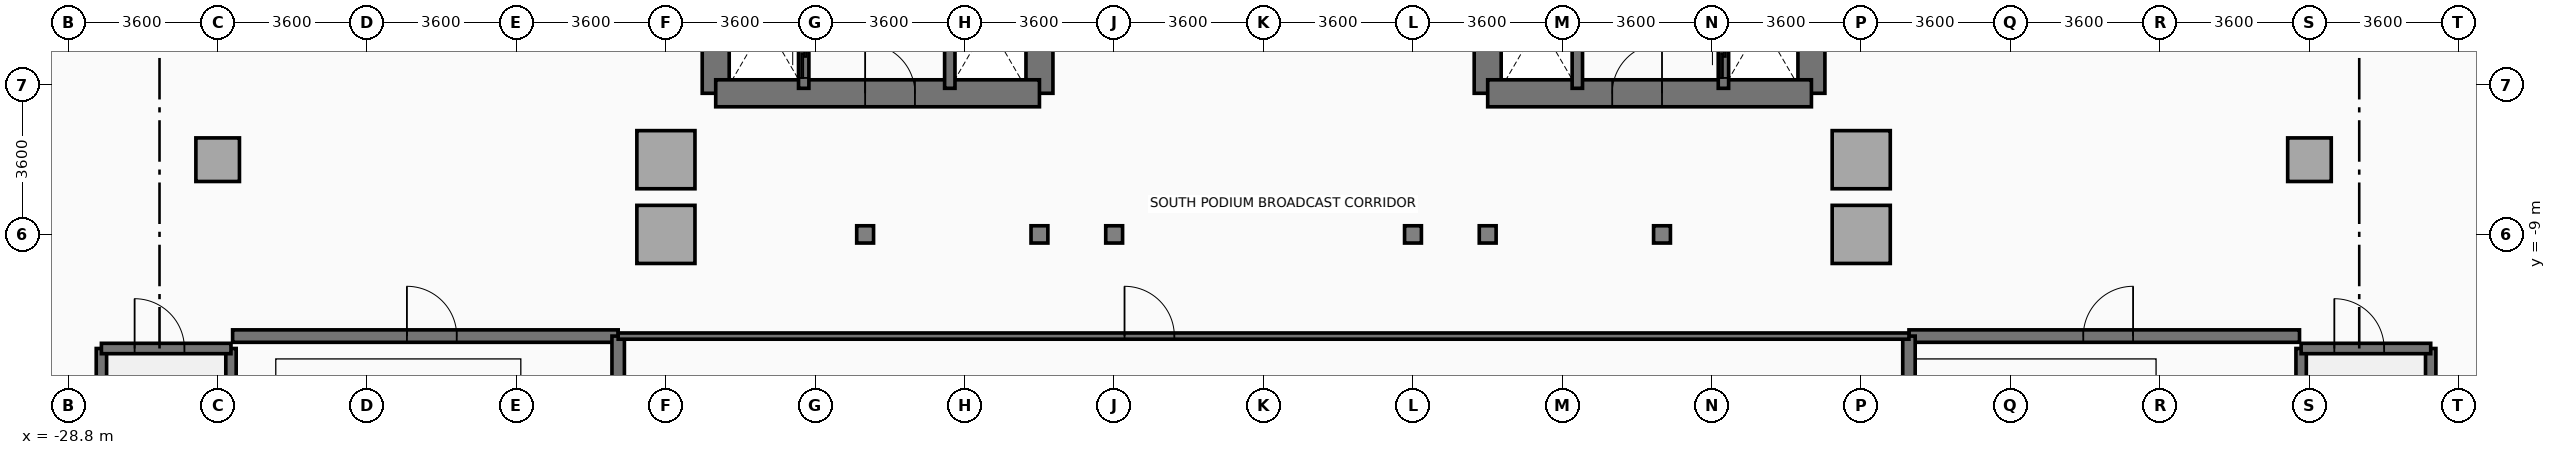
"""IFC4 building model, lengths in metres.
Left out: names, types, materials, properties, quantities, classifications, styles, units other than length and angle.
Written with IfcOpenShell. Run it as: python <this file> out.ifc"""

import sys

from ifc_helpers import new_model, si_unit, direction, frame, frame_2d, origin, origin_2d, place, context, subcontext, project, spatial, rectangle, i_section, extrude, source, transform, mapped, element, fill, save


model = new_model("IFC4")
c1 = context("Model", 3, precision=1e-05, world=origin(), true_north=direction((0.0, 1.0)))
c2 = subcontext(c1, "Body", "Model", "MODEL_VIEW")
j1 = project(units=[si_unit("LENGTHUNIT", "METRE"), si_unit("PLANEANGLEUNIT", "RADIAN")], contexts=[c1])
p1 = place(None, origin())
s1 = spatial("IfcSite", under=j1, at=p1, CompositionType="ELEMENT")
p2 = place(p1, origin())
s2 = spatial("IfcBuilding", under=s1, at=p2, CompositionType="ELEMENT")
p3 = place(p2, frame((0.0, 0.0, 10.2)))
s3 = spatial("IfcBuildingStorey", under=s2, at=p3, CompositionType="ELEMENT", Elevation=10.2)
m1 = source(origin(), c2, "Body", "SweptSolid", [
    extrude(rectangle(XDim=1.05, YDim=1.05, at=origin_2d()), origin(), (0.0, 0.0, 1.0), 5.15),
])
p4 = place(p3, frame((-25.2, -7.2, 0.0), z_axis=(0.0, 0.0, 1.0), x_axis=(1.0, 0.0, 0.0)))
e1 = element("IfcColumn", 1, at=p4, inside=s3, PredefinedType="COLUMN", context=c2, shape_type="MappedRepresentation", body=[
    mapped(m1, transform((0.0, 0.0, 0.0), x_axis=(1.0, 0.0, 0.0), y_axis=(0.0, 1.0, 0.0), z_axis=(0.0, 0.0, 1.0), scale=1.0)),
])
m2 = source(origin(), c2, "Body", "SweptSolid", [
    extrude(rectangle(XDim=1.4, YDim=1.4, at=origin_2d()), origin(), (0.0, 0.0, 1.0), 5.15),
])
for number, where, z_axis, x_axis in (
    (2, (-14.4, -9.0, 0.0), (0.0, 0.0, 1.0), (1.0, 0.0, 0.0)),
    (3, (-14.4, -7.2, 0.0), (0.0, 0.0, 1.0), (1.0, 0.0, 0.0)),
):
    element("IfcColumn", number, at=place(p3, frame(where, z_axis=z_axis, x_axis=x_axis)), inside=s3, PredefinedType="COLUMN", context=c2, shape_type="MappedRepresentation", body=[
        mapped(m2, transform((0.0, 0.0, 0.0), x_axis=(1.0, 0.0, 0.0), y_axis=(0.0, 1.0, 0.0), z_axis=(0.0, 0.0, 1.0), scale=1.0)),
    ])
m3 = source(origin(), c2, "Body", "SweptSolid", [
    extrude(i_section(OverallWidth=0.406, OverallDepth=0.416, WebThickness=0.024, FlangeThickness=0.039, at=origin_2d()), origin(), (0.0, 0.0, 1.0), 5.15),
])
for number, where, z_axis, x_axis in (
    (4, (-9.6, -9.0, 0.0), (0.0, 0.0, 1.0), (1.0, 0.0, 0.0)),
    (5, (-5.4, -9.0, 0.0), (0.0, 0.0, 1.0), (1.0, 0.0, 0.0)),
    (6, (-3.6, -9.0, 0.0), (0.0, 0.0, 1.0), (1.0, 0.0, 0.0)),
    (7, (3.6, -9.0, 0.0), (0.0, 0.0, 1.0), (1.0, 0.0, 0.0)),
    (8, (5.4, -9.0, 0.0), (0.0, 0.0, 1.0), (1.0, 0.0, 0.0)),
    (9, (9.6, -9.0, 0.0), (0.0, 0.0, 1.0), (1.0, 0.0, 0.0)),
):
    element("IfcColumn", number, at=place(p3, frame(where, z_axis=z_axis, x_axis=x_axis)), inside=s3, PredefinedType="COLUMN", context=c2, shape_type="MappedRepresentation", body=[
        mapped(m3, transform((0.0, 0.0, 0.0), x_axis=(1.0, 0.0, 0.0), y_axis=(0.0, 1.0, 0.0), z_axis=(0.0, 0.0, 1.0), scale=1.0)),
    ])
for number, where, z_axis, x_axis in (
    (10, (14.4, -9.0, 0.0), (0.0, 0.0, 1.0), (1.0, 0.0, 0.0)),
    (11, (14.4, -7.2, 0.0), (0.0, 0.0, 1.0), (1.0, 0.0, 0.0)),
):
    element("IfcColumn", number, at=place(p3, frame(where, z_axis=z_axis, x_axis=x_axis)), inside=s3, PredefinedType="COLUMN", context=c2, shape_type="MappedRepresentation", body=[
        mapped(m2, transform((0.0, 0.0, 0.0), x_axis=(1.0, 0.0, 0.0), y_axis=(0.0, 1.0, 0.0), z_axis=(0.0, 0.0, 1.0), scale=1.0)),
    ])
p5 = place(p3, frame((25.2, -7.2, 0.0), z_axis=(0.0, 0.0, 1.0), x_axis=(1.0, 0.0, 0.0)))
e12 = element("IfcColumn", 12, at=p5, inside=s3, PredefinedType="COLUMN", context=c2, shape_type="MappedRepresentation", body=[
    mapped(m1, transform((0.0, 0.0, 0.0), x_axis=(1.0, 0.0, 0.0), y_axis=(0.0, 1.0, 0.0), z_axis=(0.0, 0.0, 1.0), scale=1.0)),
])
p6 = place(p3, frame((-13.2, -5.6, 0.0), z_axis=(0.0, 0.0, 1.0), x_axis=(0.0, 1.0, 0.0)))
e13 = element("IfcWall", 13, at=p6, inside=s3, PredefinedType="SHEAR", context=c2, shape_type="SweptSolid", body=[
    extrude(rectangle(XDim=11.2, YDim=0.65, at=frame_2d((5.6, 0.0))), origin(), (0.0, 0.0, 1.0), 5.15),
])
p7 = place(p3, frame((-5.4, -5.6, 0.0), z_axis=(0.0, 0.0, 1.0), x_axis=(0.0, 1.0, 0.0)))
e14 = element("IfcWall", 14, at=p7, inside=s3, PredefinedType="SHEAR", context=c2, shape_type="SweptSolid", body=[
    extrude(rectangle(XDim=12.5, YDim=0.65, at=frame_2d((6.25, 0.0))), origin(), (0.0, 0.0, 1.0), 5.15),
])
p8 = place(p7, frame((4.55, 0.0, 0.0)))
e15 = element("IfcOpeningElement", 15, at=p8, cuts=e14, PredefinedType="OPENING", context=c2, shape_type="SweptSolid", body=[
    extrude(rectangle(XDim=1.2, YDim=2.2, at=frame_2d((0.6, 1.1))), frame((0.0, 0.335, 0.0), z_axis=(0.0, -1.0, 0.0), x_axis=(1.0, 0.0, 0.0)), (0.0, 0.0, 1.0), 0.67),
])
p9 = place(p7, frame((6.86, 0.0, 0.0)))
e16 = element("IfcOpeningElement", 16, at=p9, cuts=e14, PredefinedType="OPENING", context=c2, shape_type="SweptSolid", body=[
    extrude(rectangle(XDim=0.8, YDim=2.1, at=frame_2d((0.4, 1.05))), frame((0.0, 0.335, 0.0), z_axis=(0.0, -1.0, 0.0), x_axis=(1.0, 0.0, 0.0)), (0.0, 0.0, 1.0), 0.67),
])
p10 = place(p3, frame((-13.2, -5.6, 0.0), z_axis=(0.0, 0.0, 1.0), x_axis=(1.0, 0.0, 0.0)))
e17 = element("IfcWall", 17, at=p10, inside=s3, PredefinedType="SHEAR", context=c2, shape_type="SweptSolid", body=[
    extrude(rectangle(XDim=7.8, YDim=0.65, at=frame_2d((3.9, 0.0))), origin(), (0.0, 0.0, 1.0), 5.15),
])
p11 = place(p10, frame((3.6, 0.0, 0.0)))
e18 = element("IfcOpeningElement", 18, at=p11, cuts=e17, PredefinedType="OPENING", context=c2, shape_type="SweptSolid", body=[
    extrude(rectangle(XDim=1.2, YDim=2.2, at=frame_2d((0.6, 1.1))), frame((0.0, 0.335, 0.0), z_axis=(0.0, -1.0, 0.0), x_axis=(1.0, 0.0, 0.0)), (0.0, 0.0, 1.0), 0.67),
])
p12 = place(p3, frame((13.2, -5.6, 0.0), z_axis=(0.0, 0.0, 1.0), x_axis=(0.0, 1.0, 0.0)))
e19 = element("IfcWall", 19, at=p12, inside=s3, PredefinedType="SHEAR", context=c2, shape_type="SweptSolid", body=[
    extrude(rectangle(XDim=11.2, YDim=0.65, at=frame_2d((5.6, 0.0))), origin(), (0.0, 0.0, 1.0), 5.15),
])
p13 = place(p3, frame((5.4, -5.6, 0.0), z_axis=(0.0, 0.0, 1.0), x_axis=(0.0, 1.0, 0.0)))
e20 = element("IfcWall", 20, at=p13, inside=s3, PredefinedType="SHEAR", context=c2, shape_type="SweptSolid", body=[
    extrude(rectangle(XDim=12.5, YDim=0.65, at=frame_2d((6.25, 0.0))), origin(), (0.0, 0.0, 1.0), 5.15),
])
p14 = place(p13, frame((4.55, 0.0, 0.0)))
e21 = element("IfcOpeningElement", 21, at=p14, cuts=e20, PredefinedType="OPENING", context=c2, shape_type="SweptSolid", body=[
    extrude(rectangle(XDim=1.2, YDim=2.2, at=frame_2d((0.6, 1.1))), frame((0.0, 0.335, 0.0), z_axis=(0.0, -1.0, 0.0), x_axis=(1.0, 0.0, 0.0)), (0.0, 0.0, 1.0), 0.67),
])
p15 = place(p13, frame((6.86, 0.0, 0.0)))
e22 = element("IfcOpeningElement", 22, at=p15, cuts=e20, PredefinedType="OPENING", context=c2, shape_type="SweptSolid", body=[
    extrude(rectangle(XDim=0.8, YDim=2.1, at=frame_2d((0.4, 1.05))), frame((0.0, 0.335, 0.0), z_axis=(0.0, -1.0, 0.0), x_axis=(1.0, 0.0, 0.0)), (0.0, 0.0, 1.0), 0.67),
])
p16 = place(p3, frame((5.4, -5.6, 0.0), z_axis=(0.0, 0.0, 1.0), x_axis=(1.0, 0.0, 0.0)))
e23 = element("IfcWall", 23, at=p16, inside=s3, PredefinedType="SHEAR", context=c2, shape_type="SweptSolid", body=[
    extrude(rectangle(XDim=7.8, YDim=0.65, at=frame_2d((3.9, 0.0))), origin(), (0.0, 0.0, 1.0), 5.15),
])
p17 = place(p16, frame((3.0, 0.0, 0.0)))
e24 = element("IfcOpeningElement", 24, at=p17, cuts=e23, PredefinedType="OPENING", context=c2, shape_type="SweptSolid", body=[
    extrude(rectangle(XDim=1.2, YDim=2.2, at=frame_2d((0.6, 1.1))), frame((0.0, 0.335, 0.0), z_axis=(0.0, -1.0, 0.0), x_axis=(1.0, 0.0, 0.0)), (0.0, 0.0, 1.0), 0.67),
])
for number, where, z_axis, x_axis in (
    (25, (-28.001, -18.671, 0.0), (0.0, 0.0, 1.0), (0.0, 1.0, 0.0)),
    (26, (-24.879, -18.671, 0.0), (0.0, 0.0, 1.0), (0.0, 1.0, 0.0)),
):
    element("IfcWall", number, at=place(p3, frame(where, z_axis=z_axis, x_axis=x_axis)), inside=s3, PredefinedType="SOLIDWALL", context=c2, shape_type="SweptSolid", body=[
        extrude(rectangle(XDim=6.922, YDim=0.25, at=frame_2d((3.461, 0.0))), origin(), (0.0, 0.0, 1.0), 5.15),
    ])
p18 = place(p3, frame((-28.001, -11.749, 0.0), z_axis=(0.0, 0.0, 1.0), x_axis=(1.0, 0.0, 0.0)))
e27 = element("IfcWall", 27, at=p18, inside=s3, PredefinedType="SOLIDWALL", context=c2, shape_type="SweptSolid", body=[
    extrude(rectangle(XDim=3.122, YDim=0.25, at=frame_2d((1.561, 0.0))), origin(), (0.0, 0.0, 1.0), 5.15),
])
p19 = place(p18, frame((0.8, 0.0, 0.0)))
e28 = element("IfcOpeningElement", 28, at=p19, cuts=e27, PredefinedType="OPENING", context=c2, shape_type="SweptSolid", body=[
    extrude(rectangle(XDim=1.2, YDim=2.2, at=frame_2d((0.6, 1.1))), frame((0.0, 0.135, 0.0), z_axis=(0.0, -1.0, 0.0), x_axis=(1.0, 0.0, 0.0)), (0.0, 0.0, 1.0), 0.27),
])
for number, where, z_axis, x_axis in (
    (29, (24.999, -18.671, 0.0), (0.0, 0.0, 1.0), (0.0, 1.0, 0.0)),
    (30, (28.121, -18.671, 0.0), (0.0, 0.0, 1.0), (0.0, 1.0, 0.0)),
):
    element("IfcWall", number, at=place(p3, frame(where, z_axis=z_axis, x_axis=x_axis)), inside=s3, PredefinedType="SOLIDWALL", context=c2, shape_type="SweptSolid", body=[
        extrude(rectangle(XDim=6.922, YDim=0.25, at=frame_2d((3.461, 0.0))), origin(), (0.0, 0.0, 1.0), 5.15),
    ])
p20 = place(p3, frame((24.999, -11.749, 0.0), z_axis=(0.0, 0.0, 1.0), x_axis=(1.0, 0.0, 0.0)))
e31 = element("IfcWall", 31, at=p20, inside=s3, PredefinedType="SOLIDWALL", context=c2, shape_type="SweptSolid", body=[
    extrude(rectangle(XDim=3.122, YDim=0.25, at=frame_2d((1.561, 0.0))), origin(), (0.0, 0.0, 1.0), 5.15),
])
p21 = place(p20, frame((0.8, 0.0, 0.0)))
e32 = element("IfcOpeningElement", 32, at=p21, cuts=e31, PredefinedType="OPENING", context=c2, shape_type="SweptSolid", body=[
    extrude(rectangle(XDim=1.2, YDim=2.2, at=frame_2d((0.6, 1.1))), frame((0.0, 0.135, 0.0), z_axis=(0.0, -1.0, 0.0), x_axis=(1.0, 0.0, 0.0)), (0.0, 0.0, 1.0), 0.27),
])
p22 = place(p3, frame((-11.08, -5.48, 0.0), z_axis=(0.0, 0.0, 1.0), x_axis=(0.0, 1.0, 0.0)))
e33 = element("IfcWall", 33, at=p22, inside=s3, PredefinedType="SOLIDWALL", context=c2, shape_type="SweptSolid", body=[
    extrude(rectangle(XDim=1.6, YDim=0.25, at=frame_2d((0.8, 0.0))), origin(), (0.0, 0.0, 1.0), 5.15),
])
p23 = place(p22, frame((0.25, 0.0, 0.0)))
e34 = element("IfcOpeningElement", 34, at=p23, cuts=e33, PredefinedType="OPENING", context=c2, shape_type="SweptSolid", body=[
    extrude(rectangle(XDim=1.1, YDim=2.2, at=frame_2d((0.55, 1.1))), frame((0.0, 0.135, 0.0), z_axis=(0.0, -1.0, 0.0), x_axis=(1.0, 0.0, 0.0)), (0.0, 0.0, 1.0), 0.27),
])
p24 = place(p3, frame((11.08, -5.48, 0.0), z_axis=(0.0, 0.0, 1.0), x_axis=(0.0, 1.0, 0.0)))
e35 = element("IfcWall", 35, at=p24, inside=s3, PredefinedType="SOLIDWALL", context=c2, shape_type="SweptSolid", body=[
    extrude(rectangle(XDim=1.6, YDim=0.25, at=frame_2d((0.8, 0.0))), origin(), (0.0, 0.0, 1.0), 5.15),
])
p25 = place(p24, frame((0.25, 0.0, 0.0)))
e36 = element("IfcOpeningElement", 36, at=p25, cuts=e35, PredefinedType="OPENING", context=c2, shape_type="SweptSolid", body=[
    extrude(rectangle(XDim=1.1, YDim=2.2, at=frame_2d((0.55, 1.1))), frame((0.0, 0.135, 0.0), z_axis=(0.0, -1.0, 0.0), x_axis=(1.0, 0.0, 0.0)), (0.0, 0.0, 1.0), 0.27),
])
for number, where, z_axis, x_axis in (
    (37, (-7.56, -5.48, 0.0), (0.0, 0.0, 1.0), (0.0, 1.0, 0.0)),
    (38, (7.56, -5.48, 0.0), (0.0, 0.0, 1.0), (0.0, 1.0, 0.0)),
):
    element("IfcWall", number, at=place(p3, frame(where, z_axis=z_axis, x_axis=x_axis)), inside=s3, PredefinedType="SOLIDWALL", context=c2, shape_type="SweptSolid", body=[
        extrude(rectangle(XDim=1.6, YDim=0.25, at=frame_2d((0.8, 0.0))), origin(), (0.0, 0.0, 1.0), 5.15),
    ])
p26 = place(p3, frame((-24.84, -11.45, 0.0), z_axis=(0.0, 0.0, 1.0), x_axis=(1.0, 0.0, 0.0)))
e39 = element("IfcWall", 39, at=p26, inside=s3, PredefinedType="SOLIDWALL", context=c2, shape_type="SweptSolid", body=[
    extrude(rectangle(XDim=9.29, YDim=0.3, at=frame_2d((4.645, 0.0))), origin(), (0.0, 0.0, 1.0), 5.15),
])
p27 = place(p26, frame((4.2, 0.0, 0.0)))
e40 = element("IfcOpeningElement", 40, at=p27, cuts=e39, PredefinedType="OPENING", context=c2, shape_type="SweptSolid", body=[
    extrude(rectangle(XDim=1.2, YDim=2.2, at=frame_2d((0.6, 1.1))), frame((0.0, 0.16, 0.0), z_axis=(0.0, -1.0, 0.0), x_axis=(1.0, 0.0, 0.0)), (0.0, 0.0, 1.0), 0.32),
])
p28 = place(p3, frame((-15.55, -19.45, 0.0), z_axis=(0.0, 0.0, 1.0), x_axis=(0.0, 1.0, 0.0)))
e41 = element("IfcWall", 41, at=p28, inside=s3, PredefinedType="SOLIDWALL", context=c2, shape_type="SweptSolid", body=[
    extrude(rectangle(XDim=8.0, YDim=0.3, at=frame_2d((4.0, 0.0))), origin(), (0.0, 0.0, 1.0), 4.4),
])
p29 = place(p3, frame((15.55, -11.45, 0.0), z_axis=(0.0, 0.0, 1.0), x_axis=(1.0, 0.0, 0.0)))
e42 = element("IfcWall", 42, at=p29, inside=s3, PredefinedType="SOLIDWALL", context=c2, shape_type="SweptSolid", body=[
    extrude(rectangle(XDim=9.41, YDim=0.3, at=frame_2d((4.705, 0.0))), origin(), (0.0, 0.0, 1.0), 5.15),
])
p30 = place(p29, frame((4.2, 0.0, 0.0)))
e43 = element("IfcOpeningElement", 43, at=p30, cuts=e42, PredefinedType="OPENING", context=c2, shape_type="SweptSolid", body=[
    extrude(rectangle(XDim=1.2, YDim=2.2, at=frame_2d((0.6, 1.1))), frame((0.0, 0.16, 0.0), z_axis=(0.0, -1.0, 0.0), x_axis=(1.0, 0.0, 0.0)), (0.0, 0.0, 1.0), 0.32),
])
p31 = place(p3, frame((15.55, -19.45, 0.0), z_axis=(0.0, 0.0, 1.0), x_axis=(0.0, 1.0, 0.0)))
e44 = element("IfcWall", 44, at=p31, inside=s3, PredefinedType="SOLIDWALL", context=c2, shape_type="SweptSolid", body=[
    extrude(rectangle(XDim=8.0, YDim=0.3, at=frame_2d((4.0, 0.0))), origin(), (0.0, 0.0, 1.0), 4.4),
])
p32 = place(p3, frame((-15.55, -11.45, 0.0), z_axis=(0.0, 0.0, 1.0), x_axis=(1.0, 0.0, 0.0)))
e45 = element("IfcWall", 45, at=p32, inside=s3, PredefinedType="PARTITIONING", context=c2, shape_type="SweptSolid", body=[
    extrude(rectangle(XDim=31.1, YDim=0.15, at=frame_2d((15.55, 0.0))), origin(), (0.0, 0.0, 1.0), 4.55),
])
p33 = place(p32, frame((12.2, 0.0, 0.0)))
e46 = element("IfcOpeningElement", 46, at=p33, cuts=e45, PredefinedType="OPENING", context=c2, shape_type="SweptSolid", body=[
    extrude(rectangle(XDim=1.2, YDim=2.2, at=frame_2d((0.6, 1.1))), frame((0.0, 0.085, 0.0), z_axis=(0.0, -1.0, 0.0), x_axis=(1.0, 0.0, 0.0)), (0.0, 0.0, 1.0), 0.17),
])
m4 = source(origin(), c2, "Body", "SweptSolid", [
    extrude(rectangle(XDim=1.2, YDim=2.2, at=frame_2d((0.6, 1.1))), frame((0.0, 0.025, 0.0), z_axis=(0.0, -1.0, 0.0), x_axis=(1.0, 0.0, 0.0)), (0.0, 0.0, 1.0), 0.05),
])
p34 = place(p11, origin())
e47 = element("IfcDoor", 47, at=p34, inside=s3, OperationType="SINGLE_SWING_LEFT", PredefinedType="DOOR", context=c2, shape_type="MappedRepresentation", body=[
    mapped(m4, transform((0.0, 0.0, 0.0), x_axis=(1.0, 0.0, 0.0), y_axis=(0.0, 1.0, 0.0), z_axis=(0.0, 0.0, 1.0), scale=1.0)),
])
fill(e18, e47)
p35 = place(p17, origin())
e48 = element("IfcDoor", 48, at=p35, inside=s3, OperationType="SINGLE_SWING_RIGHT", PredefinedType="DOOR", context=c2, shape_type="MappedRepresentation", body=[
    mapped(m4, transform((0.0, 0.0, 0.0), x_axis=(1.0, 0.0, 0.0), y_axis=(0.0, 1.0, 0.0), z_axis=(0.0, 0.0, 1.0), scale=1.0)),
])
fill(e24, e48)
p36 = place(p19, origin())
e49 = element("IfcDoor", 49, at=p36, inside=s3, OperationType="SINGLE_SWING_LEFT", PredefinedType="DOOR", context=c2, shape_type="MappedRepresentation", body=[
    mapped(m4, transform((0.0, 0.0, 0.0), x_axis=(1.0, 0.0, 0.0), y_axis=(0.0, 1.0, 0.0), z_axis=(0.0, 0.0, 1.0), scale=1.0)),
])
fill(e28, e49)
p37 = place(p21, origin())
e50 = element("IfcDoor", 50, at=p37, inside=s3, OperationType="SINGLE_SWING_LEFT", PredefinedType="DOOR", context=c2, shape_type="MappedRepresentation", body=[
    mapped(m4, transform((0.0, 0.0, 0.0), x_axis=(1.0, 0.0, 0.0), y_axis=(0.0, 1.0, 0.0), z_axis=(0.0, 0.0, 1.0), scale=1.0)),
])
fill(e32, e50)
m5 = source(origin(), c2, "Body", "SweptSolid", [
    extrude(rectangle(XDim=1.1, YDim=2.2, at=frame_2d((0.55, 1.1))), frame((0.0, 0.025, 0.0), z_axis=(0.0, -1.0, 0.0), x_axis=(1.0, 0.0, 0.0)), (0.0, 0.0, 1.0), 0.05),
])
p38 = place(p23, origin())
e51 = element("IfcDoor", 51, at=p38, inside=s3, OperationType="SLIDING_TO_LEFT", PredefinedType="DOOR", context=c2, shape_type="MappedRepresentation", body=[
    mapped(m5, transform((0.0, 0.0, 0.0), x_axis=(1.0, 0.0, 0.0), y_axis=(0.0, 1.0, 0.0), z_axis=(0.0, 0.0, 1.0), scale=1.0)),
])
fill(e34, e51)
p39 = place(p25, origin())
e52 = element("IfcDoor", 52, at=p39, inside=s3, OperationType="SLIDING_TO_LEFT", PredefinedType="DOOR", context=c2, shape_type="MappedRepresentation", body=[
    mapped(m5, transform((0.0, 0.0, 0.0), x_axis=(1.0, 0.0, 0.0), y_axis=(0.0, 1.0, 0.0), z_axis=(0.0, 0.0, 1.0), scale=1.0)),
])
fill(e36, e52)
p40 = place(p27, origin())
e53 = element("IfcDoor", 53, at=p40, inside=s3, OperationType="SINGLE_SWING_LEFT", PredefinedType="DOOR", context=c2, shape_type="MappedRepresentation", body=[
    mapped(m4, transform((0.0, 0.0, 0.0), x_axis=(1.0, 0.0, 0.0), y_axis=(0.0, 1.0, 0.0), z_axis=(0.0, 0.0, 1.0), scale=1.0)),
])
fill(e40, e53)
p41 = place(p30, origin())
e54 = element("IfcDoor", 54, at=p41, inside=s3, OperationType="SINGLE_SWING_RIGHT", PredefinedType="DOOR", context=c2, shape_type="MappedRepresentation", body=[
    mapped(m4, transform((0.0, 0.0, 0.0), x_axis=(1.0, 0.0, 0.0), y_axis=(0.0, 1.0, 0.0), z_axis=(0.0, 0.0, 1.0), scale=1.0)),
])
fill(e43, e54)
p42 = place(p33, origin())
e55 = element("IfcDoor", 55, at=p42, inside=s3, OperationType="SINGLE_SWING_LEFT", PredefinedType="DOOR", context=c2, shape_type="MappedRepresentation", body=[
    mapped(m4, transform((0.0, 0.0, 0.0), x_axis=(1.0, 0.0, 0.0), y_axis=(0.0, 1.0, 0.0), z_axis=(0.0, 0.0, 1.0), scale=1.0)),
])
fill(e46, e55)
save(model, sys.argv[1])
